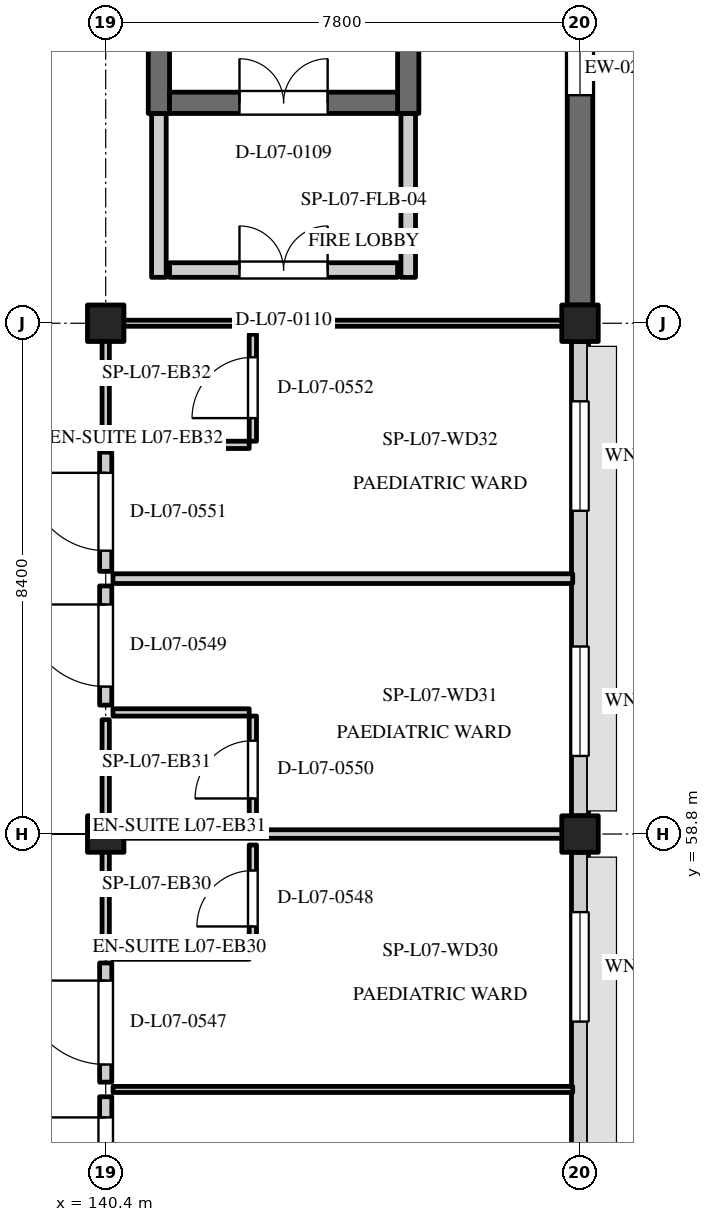
"""IFC4 building model, lengths in metres.
Left out: names, types, materials, properties, quantities, classifications, styles, units other than length and angle.
Written with IfcOpenShell. Run it as: python <this file> out.ifc"""

import sys

from ifc_helpers import new_model, si_unit, direction, frame, frame_2d, origin, origin_2d, place, context, subcontext, project, spatial, rectangle, extrude, element, fill, save


model = new_model("IFC4")
c1 = context("Model", 3, precision=1e-05, world=origin(), true_north=direction((0.0, 1.0)))
c2 = subcontext(c1, "Body", "Model", "MODEL_VIEW")
j1 = project(units=[si_unit("LENGTHUNIT", "METRE"), si_unit("PLANEANGLEUNIT", "RADIAN")], contexts=[c1])
p1 = place(None, origin())
s1 = spatial("IfcSite", under=j1, at=p1, CompositionType="ELEMENT")
p2 = place(p1, origin())
s2 = spatial("IfcBuilding", under=s1, at=p2, CompositionType="ELEMENT")
p3 = place(p2, frame((0.0, 0.0, 29.7)))
s3 = spatial("IfcBuildingStorey", under=s2, at=p3, CompositionType="ELEMENT", Elevation=29.7)
for number, where, z_axis, x_axis in (
    (1, (140.4, 58.8, 0.0), (0.0, 0.0, 1.0), (1.0, 0.0, 0.0)),
    (2, (140.4, 67.2, 0.0), (0.0, 0.0, 1.0), (1.0, 0.0, 0.0)),
    (3, (148.2, 58.8, 0.0), (0.0, 0.0, 1.0), (1.0, 0.0, 0.0)),
    (4, (148.2, 67.2, 0.0), (0.0, 0.0, 1.0), (1.0, 0.0, 0.0)),
):
    element("IfcColumn", number, at=place(p3, frame(where, z_axis=z_axis, x_axis=x_axis)), inside=s3, PredefinedType="COLUMN", context=c2, shape_type="SweptSolid", body=[
        extrude(rectangle(XDim=0.6, YDim=0.6, at=origin_2d()), origin(), (0.0, 0.0, 1.0), 4.2),
    ])
p4 = place(p3, frame((148.2, 50.7, 0.0), z_axis=(0.0, 0.0, 1.0), x_axis=(0.0, 1.0, 0.0)))
e5 = element("IfcWall", 5, at=p4, inside=s3, PredefinedType="STANDARD", context=c2, shape_type="SweptSolid", body=[
    extrude(rectangle(XDim=7.8, YDim=0.28, at=frame_2d((3.9, 0.0))), origin(), (0.0, 0.0, 1.0), 3.25),
])
p5 = place(p4, frame((0.984, 0.0, 0.8)))
e6 = element("IfcOpeningElement", 6, at=p5, cuts=e5, PredefinedType="OPENING", context=c2, shape_type="SweptSolid", body=[
    extrude(rectangle(XDim=1.8, YDim=1.65, at=frame_2d((0.9, 0.825))), frame((0.0, 0.152, 0.0), z_axis=(0.0, -1.0, 0.0), x_axis=(1.0, 0.0, 0.0)), (0.0, 0.0, 1.0), 0.304),
])
p6 = place(p4, frame((5.016, 0.0, 0.8)))
e7 = element("IfcOpeningElement", 7, at=p6, cuts=e5, PredefinedType="OPENING", context=c2, shape_type="SweptSolid", body=[
    extrude(rectangle(XDim=1.8, YDim=1.65, at=frame_2d((0.9, 0.825))), frame((0.0, 0.152, 0.0), z_axis=(0.0, -1.0, 0.0), x_axis=(1.0, 0.0, 0.0)), (0.0, 0.0, 1.0), 0.304),
])
p7 = place(p3, frame((148.2, 59.1, 0.0), z_axis=(0.0, 0.0, 1.0), x_axis=(0.0, 1.0, 0.0)))
e8 = element("IfcWall", 8, at=p7, inside=s3, PredefinedType="STANDARD", context=c2, shape_type="SweptSolid", body=[
    extrude(rectangle(XDim=7.8, YDim=0.28, at=frame_2d((3.9, 0.0))), origin(), (0.0, 0.0, 1.0), 3.25),
])
p8 = place(p7, frame((0.984, 0.0, 0.8)))
e9 = element("IfcOpeningElement", 9, at=p8, cuts=e8, PredefinedType="OPENING", context=c2, shape_type="SweptSolid", body=[
    extrude(rectangle(XDim=1.8, YDim=1.55, at=frame_2d((0.9, 0.775))), frame((0.0, 0.152, 0.0), z_axis=(0.0, -1.0, 0.0), x_axis=(1.0, 0.0, 0.0)), (0.0, 0.0, 1.0), 0.304),
])
p9 = place(p7, frame((5.016, 0.0, 0.8)))
e10 = element("IfcOpeningElement", 10, at=p9, cuts=e8, PredefinedType="OPENING", context=c2, shape_type="SweptSolid", body=[
    extrude(rectangle(XDim=1.8, YDim=1.55, at=frame_2d((0.9, 0.775))), frame((0.0, 0.152, 0.0), z_axis=(0.0, -1.0, 0.0), x_axis=(1.0, 0.0, 0.0)), (0.0, 0.0, 1.0), 0.304),
])
p10 = place(p3, frame((148.2, 67.5, 0.0), z_axis=(0.0, 0.0, 1.0), x_axis=(0.0, 1.0, 0.0)))
e11 = element("IfcWall", 11, at=p10, inside=s3, PredefinedType="SOLIDWALL", context=c2, shape_type="SweptSolid", body=[
    extrude(rectangle(XDim=7.8, YDim=0.42, at=frame_2d((3.9, 0.0))), origin(), (0.0, 0.0, 1.0), 3.25),
])
p11 = place(p10, frame((3.45, 0.0, 0.8)))
e12 = element("IfcOpeningElement", 12, at=p11, cuts=e11, PredefinedType="OPENING", context=c2, shape_type="SweptSolid", body=[
    extrude(rectangle(XDim=0.9, YDim=1.3, at=frame_2d((0.45, 0.65))), frame((0.0, 0.222, 0.0), z_axis=(0.0, -1.0, 0.0), x_axis=(1.0, 0.0, 0.0)), (0.0, 0.0, 1.0), 0.444),
])
for number, where, z_axis, x_axis in (
    (13, (141.275, 70.65, 0.0), (0.0, 0.0, 1.0), (0.0, 1.0, 0.0)),
    (14, (145.375, 70.65, 0.0), (0.0, 0.0, 1.0), (0.0, 1.0, 0.0)),
):
    element("IfcWall", number, at=place(p3, frame(where, z_axis=z_axis, x_axis=x_axis)), inside=s3, PredefinedType="SHEAR", context=c2, shape_type="SweptSolid", body=[
        extrude(rectangle(XDim=10.5, YDim=0.35, at=frame_2d((5.25, 0.0))), origin(), (0.0, 0.0, 1.0), 3.9),
    ])
p12 = place(p3, frame((141.45, 70.825, 0.0), z_axis=(0.0, 0.0, 1.0), x_axis=(1.0, 0.0, 0.0)))
e15 = element("IfcWall", 15, at=p12, inside=s3, PredefinedType="SHEAR", context=c2, shape_type="SweptSolid", body=[
    extrude(rectangle(XDim=3.75, YDim=0.35, at=frame_2d((1.875, 0.0))), origin(), (0.0, 0.0, 1.0), 3.9),
])
p13 = place(p12, frame((1.15, 0.0, 0.0)))
e16 = element("IfcOpeningElement", 16, at=p13, cuts=e15, PredefinedType="OPENING", context=c2, shape_type="SweptSolid", body=[
    extrude(rectangle(XDim=1.45, YDim=2.2, at=frame_2d((0.725, 1.1))), frame((0.0, 0.187, 0.0), z_axis=(0.0, -1.0, 0.0), x_axis=(1.0, 0.0, 0.0)), (0.0, 0.0, 1.0), 0.374),
])
for number, where, z_axis, x_axis in (
    (17, (141.275, 67.955, 0.0), (0.0, 0.0, 1.0), (0.0, 1.0, 0.0)),
    (18, (145.375, 67.955, 0.0), (0.0, 0.0, 1.0), (0.0, 1.0, 0.0)),
):
    element("IfcWall", number, at=place(p3, frame(where, z_axis=z_axis, x_axis=x_axis)), inside=s3, PredefinedType="STANDARD", context=c2, shape_type="SweptSolid", body=[
        extrude(rectangle(XDim=2.695, YDim=0.24, at=frame_2d((1.347, 0.0))), origin(), (0.0, 0.0, 1.0), 3.9),
    ])
p14 = place(p3, frame((141.45, 68.075, 0.0), z_axis=(0.0, 0.0, 1.0), x_axis=(1.0, 0.0, 0.0)))
e19 = element("IfcWall", 19, at=p14, inside=s3, PredefinedType="STANDARD", context=c2, shape_type="SweptSolid", body=[
    extrude(rectangle(XDim=3.75, YDim=0.24, at=frame_2d((1.875, 0.0))), origin(), (0.0, 0.0, 1.0), 3.9),
])
p15 = place(p14, frame((1.15, 0.0, 0.0)))
e20 = element("IfcOpeningElement", 20, at=p15, cuts=e19, PredefinedType="OPENING", context=c2, shape_type="SweptSolid", body=[
    extrude(rectangle(XDim=1.45, YDim=2.2, at=frame_2d((0.725, 1.1))), frame((0.0, 0.132, 0.0), z_axis=(0.0, -1.0, 0.0), x_axis=(1.0, 0.0, 0.0)), (0.0, 0.0, 1.0), 0.264),
])
p16 = place(p3, frame((140.52, 54.6, 0.0), z_axis=(0.0, 0.0, 1.0), x_axis=(1.0, 0.0, 0.0)))
e21 = element("IfcWall", 21, at=p16, inside=s3, PredefinedType="PARTITIONING", context=c2, shape_type="SweptSolid", body=[
    extrude(rectangle(XDim=7.56, YDim=0.1, at=frame_2d((3.78, 0.0))), origin(), (0.0, 0.0, 1.0), 3.88),
])
p17 = place(p3, frame((140.4, 52.52, 0.0), z_axis=(0.0, 0.0, 1.0), x_axis=(0.0, 1.0, 0.0)))
e22 = element("IfcWall", 22, at=p17, inside=s3, PredefinedType="STANDARD", context=c2, shape_type="SweptSolid", body=[
    extrude(rectangle(XDim=1.96, YDim=0.2, at=frame_2d((0.98, 0.0))), origin(), (0.0, 0.0, 1.0), 3.88),
])
p18 = place(p17, frame((0.34, 0.0, 0.0)))
e23 = element("IfcOpeningElement", 23, at=p18, cuts=e22, PredefinedType="OPENING", context=c2, shape_type="SweptSolid", body=[
    extrude(rectangle(XDim=1.28, YDim=2.15, at=frame_2d((0.64, 1.075))), frame((0.0, 0.112, 0.0), z_axis=(0.0, -1.0, 0.0), x_axis=(1.0, 0.0, 0.0)), (0.0, 0.0, 1.0), 0.224),
])
p19 = place(p3, frame((140.52, 58.8, 0.0), z_axis=(0.0, 0.0, 1.0), x_axis=(1.0, 0.0, 0.0)))
e24 = element("IfcWall", 24, at=p19, inside=s3, PredefinedType="PARTITIONING", context=c2, shape_type="SweptSolid", body=[
    extrude(rectangle(XDim=7.56, YDim=0.14, at=frame_2d((3.78, 0.0))), origin(), (0.0, 0.0, 1.0), 3.25),
])
p20 = place(p3, frame((140.4, 54.72, 0.0), z_axis=(0.0, 0.0, 1.0), x_axis=(0.0, 1.0, 0.0)))
e25 = element("IfcWall", 25, at=p20, inside=s3, PredefinedType="STANDARD", context=c2, shape_type="SweptSolid", body=[
    extrude(rectangle(XDim=1.96, YDim=0.2, at=frame_2d((0.98, 0.0))), origin(), (0.0, 0.0, 1.0), 3.88),
])
p21 = place(p20, frame((0.29, 0.0, 0.0)))
e26 = element("IfcOpeningElement", 26, at=p21, cuts=e25, PredefinedType="OPENING", context=c2, shape_type="SweptSolid", body=[
    extrude(rectangle(XDim=1.38, YDim=2.2, at=frame_2d((0.69, 1.1))), frame((0.0, 0.112, 0.0), z_axis=(0.0, -1.0, 0.0), x_axis=(1.0, 0.0, 0.0)), (0.0, 0.0, 1.0), 0.224),
])
p22 = place(p3, frame((140.4, 56.92, 0.0), z_axis=(0.0, 0.0, 1.0), x_axis=(0.0, 1.0, 0.0)))
e27 = element("IfcWall", 27, at=p22, inside=s3, PredefinedType="PARTITIONING", context=c2, shape_type="SweptSolid", body=[
    extrude(rectangle(XDim=1.76, YDim=0.12, at=frame_2d((0.88, 0.0))), origin(), (0.0, 0.0, 1.0), 3.88),
])
p23 = place(p3, frame((140.52, 56.8, 0.0), z_axis=(0.0, 0.0, 1.0), x_axis=(1.0, 0.0, 0.0)))
e28 = element("IfcWall", 28, at=p23, inside=s3, PredefinedType="PARTITIONING", context=c2, shape_type="SweptSolid", body=[
    extrude(rectangle(XDim=2.24, YDim=0.12, at=frame_2d((1.12, 0.0))), origin(), (0.0, 0.0, 1.0), 3.88),
])
p24 = place(p3, frame((142.82, 56.86, 0.0), z_axis=(0.0, 0.0, 1.0), x_axis=(0.0, 1.0, 0.0)))
e29 = element("IfcWall", 29, at=p24, inside=s3, PredefinedType="PARTITIONING", context=c2, shape_type="SweptSolid", body=[
    extrude(rectangle(XDim=1.76, YDim=0.12, at=frame_2d((0.88, 0.0))), origin(), (0.0, 0.0, 1.0), 3.88),
])
p25 = place(p24, frame((0.42, 0.0, 0.0)))
e30 = element("IfcOpeningElement", 30, at=p25, cuts=e29, PredefinedType="OPENING", context=c2, shape_type="SweptSolid", body=[
    extrude(rectangle(XDim=0.92, YDim=2.08, at=frame_2d((0.46, 1.04))), frame((0.0, 0.072, 0.0), z_axis=(0.0, -1.0, 0.0), x_axis=(1.0, 0.0, 0.0)), (0.0, 0.0, 1.0), 0.144),
])
p26 = place(p3, frame((140.52, 63.0, 0.0), z_axis=(0.0, 0.0, 1.0), x_axis=(1.0, 0.0, 0.0)))
e31 = element("IfcWall", 31, at=p26, inside=s3, PredefinedType="PARTITIONING", context=c2, shape_type="SweptSolid", body=[
    extrude(rectangle(XDim=7.56, YDim=0.16, at=frame_2d((3.78, 0.0))), origin(), (0.0, 0.0, 1.0), 3.88),
])
p27 = place(p3, frame((140.4, 60.92, 0.0), z_axis=(0.0, 0.0, 1.0), x_axis=(0.0, 1.0, 0.0)))
e32 = element("IfcWall", 32, at=p27, inside=s3, PredefinedType="STANDARD", context=c2, shape_type="SweptSolid", body=[
    extrude(rectangle(XDim=1.96, YDim=0.2, at=frame_2d((0.98, 0.0))), origin(), (0.0, 0.0, 1.0), 3.88),
])
p28 = place(p27, frame((0.305, 0.0, 0.0)))
e33 = element("IfcOpeningElement", 33, at=p28, cuts=e32, PredefinedType="OPENING", context=c2, shape_type="SweptSolid", body=[
    extrude(rectangle(XDim=1.35, YDim=2.15, at=frame_2d((0.675, 1.075))), frame((0.0, 0.112, 0.0), z_axis=(0.0, -1.0, 0.0), x_axis=(1.0, 0.0, 0.0)), (0.0, 0.0, 1.0), 0.224),
])
p29 = place(p3, frame((140.4, 58.92, 0.0), z_axis=(0.0, 0.0, 1.0), x_axis=(0.0, 1.0, 0.0)))
e34 = element("IfcWall", 34, at=p29, inside=s3, PredefinedType="PARTITIONING", context=c2, shape_type="SweptSolid", body=[
    extrude(rectangle(XDim=1.76, YDim=0.12, at=frame_2d((0.88, 0.0))), origin(), (0.0, 0.0, 1.0), 3.88),
])
p30 = place(p3, frame((140.52, 60.8, 0.0), z_axis=(0.0, 0.0, 1.0), x_axis=(1.0, 0.0, 0.0)))
e35 = element("IfcWall", 35, at=p30, inside=s3, PredefinedType="PARTITIONING", context=c2, shape_type="SweptSolid", body=[
    extrude(rectangle(XDim=2.24, YDim=0.12, at=frame_2d((1.12, 0.0))), origin(), (0.0, 0.0, 1.0), 3.88),
])
p31 = place(p3, frame((142.82, 58.98, 0.0), z_axis=(0.0, 0.0, 1.0), x_axis=(0.0, 1.0, 0.0)))
e36 = element("IfcWall", 36, at=p31, inside=s3, PredefinedType="PARTITIONING", context=c2, shape_type="SweptSolid", body=[
    extrude(rectangle(XDim=1.76, YDim=0.12, at=frame_2d((0.88, 0.0))), origin(), (0.0, 0.0, 1.0), 3.88),
])
p32 = place(p31, frame((0.405, 0.0, 0.0)))
e37 = element("IfcOpeningElement", 37, at=p32, cuts=e36, PredefinedType="OPENING", context=c2, shape_type="SweptSolid", body=[
    extrude(rectangle(XDim=0.95, YDim=2.1, at=frame_2d((0.475, 1.05))), frame((0.0, 0.072, 0.0), z_axis=(0.0, -1.0, 0.0), x_axis=(1.0, 0.0, 0.0)), (0.0, 0.0, 1.0), 0.144),
])
p33 = place(p3, frame((140.52, 67.2, 0.0), z_axis=(0.0, 0.0, 1.0), x_axis=(1.0, 0.0, 0.0)))
e38 = element("IfcWall", 38, at=p33, inside=s3, PredefinedType="PARTITIONING", context=c2, shape_type="SweptSolid", body=[
    extrude(rectangle(XDim=7.56, YDim=0.1, at=frame_2d((3.78, 0.0))), origin(), (0.0, 0.0, 1.0), 3.88),
])
p34 = place(p3, frame((140.4, 63.12, 0.0), z_axis=(0.0, 0.0, 1.0), x_axis=(0.0, 1.0, 0.0)))
e39 = element("IfcWall", 39, at=p34, inside=s3, PredefinedType="STANDARD", context=c2, shape_type="SweptSolid", body=[
    extrude(rectangle(XDim=1.96, YDim=0.2, at=frame_2d((0.98, 0.0))), origin(), (0.0, 0.0, 1.0), 3.88),
])
p35 = place(p34, frame((0.34, 0.0, 0.0)))
e40 = element("IfcOpeningElement", 40, at=p35, cuts=e39, PredefinedType="OPENING", context=c2, shape_type="SweptSolid", body=[
    extrude(rectangle(XDim=1.28, YDim=2.15, at=frame_2d((0.64, 1.075))), frame((0.0, 0.112, 0.0), z_axis=(0.0, -1.0, 0.0), x_axis=(1.0, 0.0, 0.0)), (0.0, 0.0, 1.0), 0.224),
])
p36 = place(p3, frame((140.4, 65.32, 0.0), z_axis=(0.0, 0.0, 1.0), x_axis=(0.0, 1.0, 0.0)))
e41 = element("IfcWall", 41, at=p36, inside=s3, PredefinedType="PARTITIONING", context=c2, shape_type="SweptSolid", body=[
    extrude(rectangle(XDim=1.76, YDim=0.12, at=frame_2d((0.88, 0.0))), origin(), (0.0, 0.0, 1.0), 3.88),
])
p37 = place(p3, frame((140.52, 65.2, 0.0), z_axis=(0.0, 0.0, 1.0), x_axis=(1.0, 0.0, 0.0)))
e42 = element("IfcWall", 42, at=p37, inside=s3, PredefinedType="PARTITIONING", context=c2, shape_type="SweptSolid", body=[
    extrude(rectangle(XDim=2.24, YDim=0.12, at=frame_2d((1.12, 0.0))), origin(), (0.0, 0.0, 1.0), 3.88),
])
p38 = place(p3, frame((142.82, 65.26, 0.0), z_axis=(0.0, 0.0, 1.0), x_axis=(0.0, 1.0, 0.0)))
e43 = element("IfcWall", 43, at=p38, inside=s3, PredefinedType="PARTITIONING", context=c2, shape_type="SweptSolid", body=[
    extrude(rectangle(XDim=1.76, YDim=0.12, at=frame_2d((0.88, 0.0))), origin(), (0.0, 0.0, 1.0), 3.88),
])
p39 = place(p38, frame((0.38, 0.0, 0.0)))
e44 = element("IfcOpeningElement", 44, at=p39, cuts=e43, PredefinedType="OPENING", context=c2, shape_type="SweptSolid", body=[
    extrude(rectangle(XDim=1.0, YDim=2.1, at=frame_2d((0.5, 1.05))), frame((0.0, 0.072, 0.0), z_axis=(0.0, -1.0, 0.0), x_axis=(1.0, 0.0, 0.0)), (0.0, 0.0, 1.0), 0.144),
])
p40 = place(p6, origin())
e45 = element("IfcWindow", 45, at=p40, inside=s3, PartitioningType="DOUBLE_PANEL_VERTICAL", PredefinedType="WINDOW", context=c2, shape_type="SweptSolid", body=[
    extrude(rectangle(XDim=1.8, YDim=1.65, at=frame_2d((0.9, 0.825))), frame((0.0, 0.03, 0.0), z_axis=(0.0, -1.0, 0.0), x_axis=(1.0, 0.0, 0.0)), (0.0, 0.0, 1.0), 0.06),
])
fill(e7, e45)
p41 = place(p8, origin())
e46 = element("IfcWindow", 46, at=p41, inside=s3, PartitioningType="DOUBLE_PANEL_VERTICAL", PredefinedType="WINDOW", context=c2, shape_type="SweptSolid", body=[
    extrude(rectangle(XDim=1.8, YDim=1.55, at=frame_2d((0.9, 0.775))), frame((0.0, 0.03, 0.0), z_axis=(0.0, -1.0, 0.0), x_axis=(1.0, 0.0, 0.0)), (0.0, 0.0, 1.0), 0.06),
])
fill(e9, e46)
p42 = place(p9, origin())
e47 = element("IfcWindow", 47, at=p42, inside=s3, PartitioningType="DOUBLE_PANEL_VERTICAL", PredefinedType="WINDOW", context=c2, shape_type="SweptSolid", body=[
    extrude(rectangle(XDim=1.8, YDim=1.55, at=frame_2d((0.9, 0.775))), frame((0.0, 0.03, 0.0), z_axis=(0.0, -1.0, 0.0), x_axis=(1.0, 0.0, 0.0)), (0.0, 0.0, 1.0), 0.06),
])
fill(e10, e47)
p43 = place(p11, origin())
e48 = element("IfcWindow", 48, at=p43, inside=s3, PartitioningType="SINGLE_PANEL", PredefinedType="WINDOW", context=c2, shape_type="SweptSolid", body=[
    extrude(rectangle(XDim=0.9, YDim=1.3, at=frame_2d((0.45, 0.65))), frame((0.0, 0.03, 0.0), z_axis=(0.0, -1.0, 0.0), x_axis=(1.0, 0.0, 0.0)), (0.0, 0.0, 1.0), 0.06),
])
fill(e12, e48)
p44 = place(p13, origin())
e49 = element("IfcDoor", 49, at=p44, inside=s3, OperationType="DOUBLE_DOOR_SINGLE_SWING", PredefinedType="DOOR", context=c2, shape_type="SweptSolid", body=[
    extrude(rectangle(XDim=1.45, YDim=2.2, at=frame_2d((0.725, 1.1))), frame((0.0, 0.025, 0.0), z_axis=(0.0, -1.0, 0.0), x_axis=(1.0, 0.0, 0.0)), (0.0, 0.0, 1.0), 0.05),
])
fill(e16, e49)
p45 = place(p15, origin())
e50 = element("IfcDoor", 50, at=p45, inside=s3, OperationType="DOUBLE_DOOR_SINGLE_SWING", PredefinedType="DOOR", context=c2, shape_type="SweptSolid", body=[
    extrude(rectangle(XDim=1.45, YDim=2.2, at=frame_2d((0.725, 1.1))), frame((0.0, 0.025, 0.0), z_axis=(0.0, -1.0, 0.0), x_axis=(1.0, 0.0, 0.0)), (0.0, 0.0, 1.0), 0.05),
])
fill(e20, e50)
p46 = place(p18, frame((1.28, 0.0, 0.0), z_axis=(0.0, 0.0, 1.0), x_axis=(-1.0, 0.0, 0.0)))
e51 = element("IfcDoor", 51, at=p46, inside=s3, OperationType="SINGLE_SWING_LEFT", PredefinedType="DOOR", context=c2, shape_type="SweptSolid", body=[
    extrude(rectangle(XDim=1.28, YDim=2.15, at=frame_2d((0.64, 1.075))), frame((0.0, 0.025, 0.0), z_axis=(0.0, -1.0, 0.0), x_axis=(1.0, 0.0, 0.0)), (0.0, 0.0, 1.0), 0.05),
])
fill(e23, e51)
p47 = place(p21, frame((1.38, 0.0, 0.0), z_axis=(0.0, 0.0, 1.0), x_axis=(-1.0, 0.0, 0.0)))
e52 = element("IfcDoor", 52, at=p47, inside=s3, OperationType="SINGLE_SWING_LEFT", PredefinedType="DOOR", context=c2, shape_type="SweptSolid", body=[
    extrude(rectangle(XDim=1.38, YDim=2.2, at=frame_2d((0.69, 1.1))), frame((0.0, 0.025, 0.0), z_axis=(0.0, -1.0, 0.0), x_axis=(1.0, 0.0, 0.0)), (0.0, 0.0, 1.0), 0.05),
])
fill(e26, e52)
p48 = place(p25, origin())
e53 = element("IfcDoor", 53, at=p48, inside=s3, OperationType="SINGLE_SWING_LEFT", PredefinedType="DOOR", context=c2, shape_type="SweptSolid", body=[
    extrude(rectangle(XDim=0.92, YDim=2.08, at=frame_2d((0.46, 1.04))), frame((0.0, 0.025, 0.0), z_axis=(0.0, -1.0, 0.0), x_axis=(1.0, 0.0, 0.0)), (0.0, 0.0, 1.0), 0.05),
])
fill(e30, e53)
p49 = place(p28, frame((1.35, 0.0, 0.0), z_axis=(0.0, 0.0, 1.0), x_axis=(-1.0, 0.0, 0.0)))
e54 = element("IfcDoor", 54, at=p49, inside=s3, OperationType="SINGLE_SWING_LEFT", PredefinedType="DOOR", context=c2, shape_type="SweptSolid", body=[
    extrude(rectangle(XDim=1.35, YDim=2.15, at=frame_2d((0.675, 1.075))), frame((0.0, 0.025, 0.0), z_axis=(0.0, -1.0, 0.0), x_axis=(1.0, 0.0, 0.0)), (0.0, 0.0, 1.0), 0.05),
])
fill(e33, e54)
p50 = place(p32, origin())
e55 = element("IfcDoor", 55, at=p50, inside=s3, OperationType="SINGLE_SWING_LEFT", PredefinedType="DOOR", context=c2, shape_type="SweptSolid", body=[
    extrude(rectangle(XDim=0.95, YDim=2.1, at=frame_2d((0.475, 1.05))), frame((0.0, 0.025, 0.0), z_axis=(0.0, -1.0, 0.0), x_axis=(1.0, 0.0, 0.0)), (0.0, 0.0, 1.0), 0.05),
])
fill(e37, e55)
p51 = place(p35, frame((1.28, 0.0, 0.0), z_axis=(0.0, 0.0, 1.0), x_axis=(-1.0, 0.0, 0.0)))
e56 = element("IfcDoor", 56, at=p51, inside=s3, OperationType="SINGLE_SWING_LEFT", PredefinedType="DOOR", context=c2, shape_type="SweptSolid", body=[
    extrude(rectangle(XDim=1.28, YDim=2.15, at=frame_2d((0.64, 1.075))), frame((0.0, 0.025, 0.0), z_axis=(0.0, -1.0, 0.0), x_axis=(1.0, 0.0, 0.0)), (0.0, 0.0, 1.0), 0.05),
])
fill(e40, e56)
p52 = place(p39, origin())
e57 = element("IfcDoor", 57, at=p52, inside=s3, OperationType="SINGLE_SWING_LEFT", PredefinedType="DOOR", context=c2, shape_type="SweptSolid", body=[
    extrude(rectangle(XDim=1.0, YDim=2.1, at=frame_2d((0.5, 1.05))), frame((0.0, 0.025, 0.0), z_axis=(0.0, -1.0, 0.0), x_axis=(1.0, 0.0, 0.0)), (0.0, 0.0, 1.0), 0.05),
])
fill(e44, e57)
save(model, sys.argv[1])
